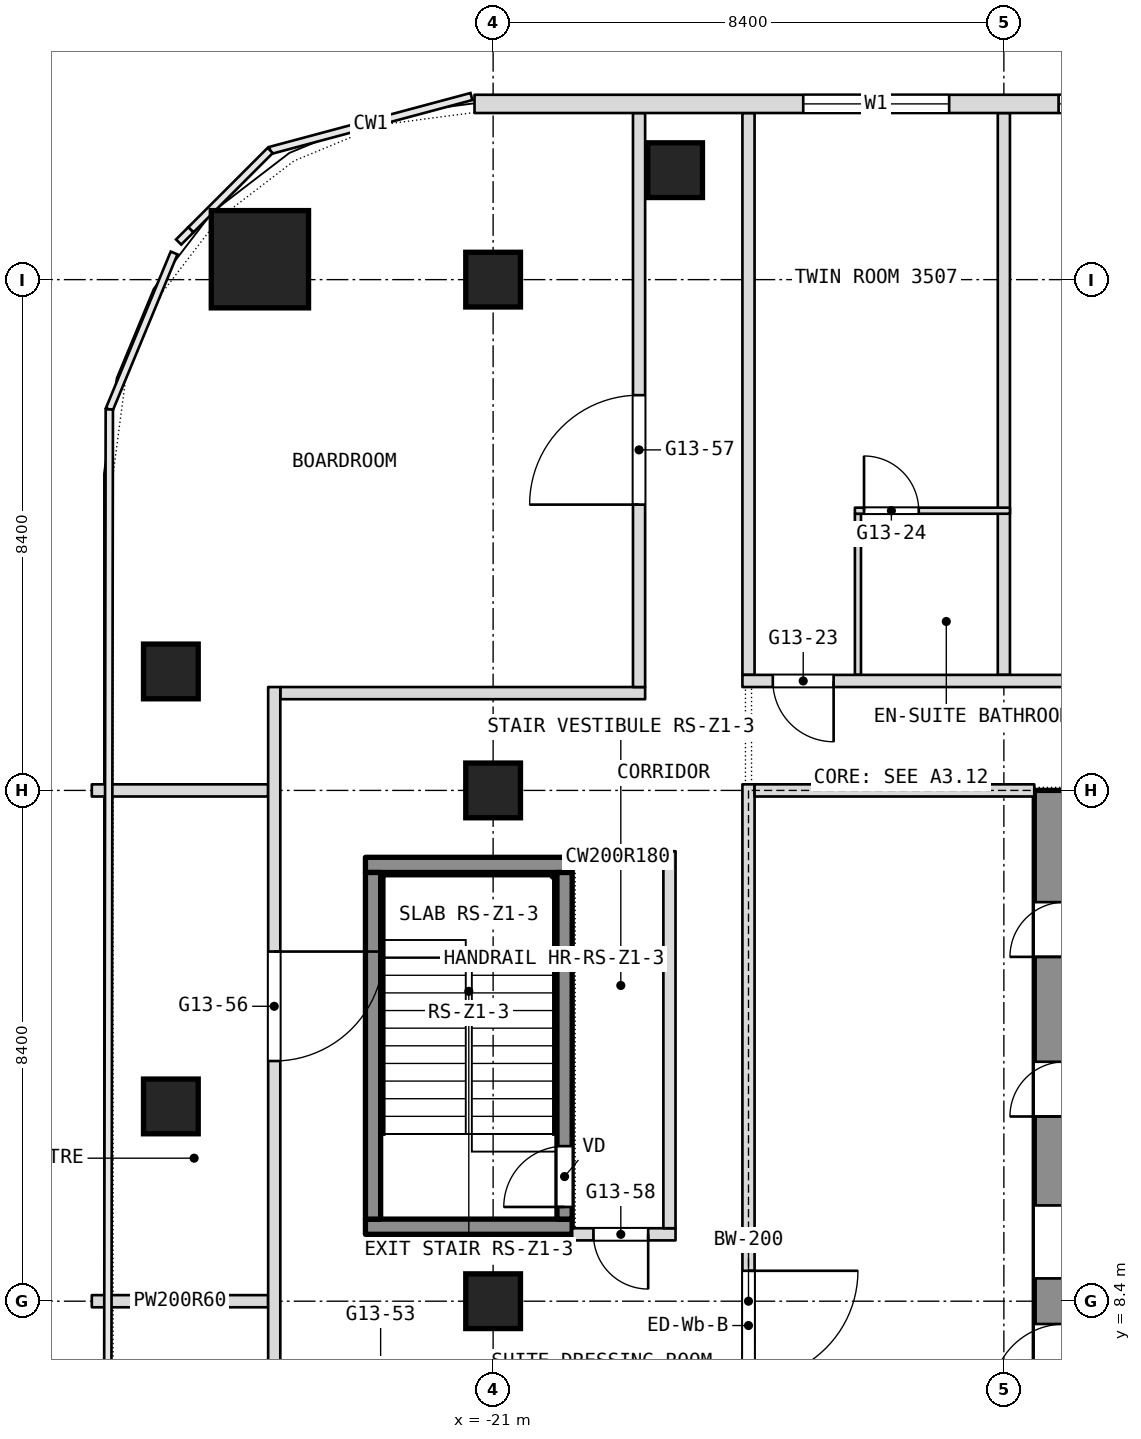
"""IFC4 building model, lengths in metres.
Left out: names, types, materials, properties, quantities, classifications, styles, units other than length and angle.
Written with IfcOpenShell. Run it as: python <this file> out.ifc"""

import sys

from ifc_helpers import new_model, si_unit, direction, frame, frame_2d, origin, origin_2d, place, context, subcontext, project, spatial, rectangle, extrude, element, fill, save


model = new_model("IFC4")
c1 = context("Model", 3, precision=1e-05, world=origin(), true_north=direction((0.0, 1.0)))
c2 = subcontext(c1, "Body", "Model", "MODEL_VIEW")
j1 = project(units=[si_unit("LENGTHUNIT", "METRE"), si_unit("PLANEANGLEUNIT", "RADIAN")], contexts=[c1])
p1 = place(None, origin())
s1 = spatial("IfcSite", under=j1, at=p1, CompositionType="ELEMENT")
p2 = place(p1, origin())
s2 = spatial("IfcBuilding", under=s1, at=p2, CompositionType="ELEMENT")
p3 = place(p2, frame((0.0, 0.0, 151.7)))
s3 = spatial("IfcBuildingStorey", under=s2, at=p3, CompositionType="ELEMENT", Elevation=151.7)
p4 = place(p3, frame((-11.6, 0.0, 0.0), z_axis=(0.0, 0.0, 1.0), x_axis=(0.0, 1.0, 0.0)))
e1 = element("IfcWall", 1, at=p4, inside=s3, PredefinedType="SHEAR", context=c2, shape_type="SweptSolid", body=[
    extrude(rectangle(XDim=16.8, YDim=1.0, at=frame_2d((8.4, 0.0))), origin(), (0.0, 0.0, 1.0), 3.6),
])
p5 = place(p4, frame((3.6, 0.0, 0.0)))
e2 = element("IfcOpeningElement", 2, at=p5, cuts=e1, PredefinedType="OPENING", context=c2, shape_type="SweptSolid", body=[
    extrude(rectangle(XDim=0.9, YDim=2.1, at=frame_2d((0.45, 1.05))), frame((0.0, 0.5, 0.0), z_axis=(0.0, -1.0, 0.0), x_axis=(1.0, 0.0, 0.0)), (0.0, 0.0, 1.0), 1.0),
])
p6 = place(p4, frame((6.825, 0.0, 0.0)))
e3 = element("IfcOpeningElement", 3, at=p6, cuts=e1, PredefinedType="OPENING", context=c2, shape_type="SweptSolid", body=[
    extrude(rectangle(XDim=1.2, YDim=2.1, at=frame_2d((0.6, 1.05))), frame((0.0, 0.5, 0.0), z_axis=(0.0, -1.0, 0.0), x_axis=(1.0, 0.0, 0.0)), (0.0, 0.0, 1.0), 1.0),
])
p7 = place(p4, frame((14.062, 0.0, 0.0)))
e4 = element("IfcOpeningElement", 4, at=p7, cuts=e1, PredefinedType="OPENING", context=c2, shape_type="SweptSolid", body=[
    extrude(rectangle(XDim=0.9, YDim=2.1, at=frame_2d((0.45, 1.05))), frame((0.0, 0.5, 0.0), z_axis=(0.0, -1.0, 0.0), x_axis=(1.0, 0.0, 0.0)), (0.0, 0.0, 1.0), 1.0),
])
p8 = place(p4, frame((11.438, 0.0, 0.0)))
e5 = element("IfcOpeningElement", 5, at=p8, cuts=e1, PredefinedType="OPENING", context=c2, shape_type="SweptSolid", body=[
    extrude(rectangle(XDim=0.9, YDim=2.1, at=frame_2d((0.45, 1.05))), frame((0.0, 0.5, 0.0), z_axis=(0.0, -1.0, 0.0), x_axis=(1.0, 0.0, 0.0)), (0.0, 0.0, 1.0), 1.0),
])
p9 = place(p4, frame((8.775, 0.0, 0.0)))
e6 = element("IfcOpeningElement", 6, at=p9, cuts=e1, PredefinedType="OPENING", context=c2, shape_type="SweptSolid", body=[
    extrude(rectangle(XDim=1.2, YDim=2.1, at=frame_2d((0.6, 1.05))), frame((0.0, 0.5, 0.0), z_axis=(0.0, -1.0, 0.0), x_axis=(1.0, 0.0, 0.0)), (0.0, 0.0, 1.0), 1.0),
])
p10 = place(p3, frame((-24.835, 25.535, 0.0), z_axis=(0.0, 0.0, 1.0), x_axis=(1.0, 0.0, 0.0)))
e7 = element("IfcColumn", 7, at=p10, inside=s3, PredefinedType="COLUMN", context=c2, shape_type="SweptSolid", body=[
    extrude(rectangle(XDim=1.6, YDim=1.6, at=origin_2d()), origin(), (0.0, 0.0, 1.0), 3.6),
])
for number, where, z_axis, x_axis in (
    (8, (-21.0, 8.4, 0.0), (0.0, 0.0, 1.0), (1.0, 0.0, 0.0)),
    (9, (-21.0, 16.8, 0.0), (0.0, 0.0, 1.0), (1.0, 0.0, 0.0)),
    (10, (-21.0, 25.2, 0.0), (0.0, 0.0, 1.0), (1.0, 0.0, 0.0)),
    (11, (-26.3, 11.603, 0.0), (0.0, 0.0, 1.0), (1.0, 0.0, 0.0)),
    (12, (-26.3, 18.756, 0.0), (0.0, 0.0, 1.0), (1.0, 0.0, 0.0)),
    (13, (-18.007, 27.0, 0.0), (0.0, 0.0, 1.0), (1.0, 0.0, 0.0)),
):
    element("IfcColumn", number, at=place(p3, frame(where, z_axis=z_axis, x_axis=x_axis)), inside=s3, PredefinedType="COLUMN", context=c2, shape_type="SweptSolid", body=[
        extrude(rectangle(XDim=0.9, YDim=0.9, at=origin_2d()), origin(), (0.0, 0.0, 1.0), 3.6),
    ])
p11 = place(p3, frame((-27.6, 8.4, 0.0), z_axis=(0.0, 0.0, 1.0), x_axis=(1.0, 0.0, 0.0)))
e14 = element("IfcWall", 14, at=p11, inside=s3, PredefinedType="PARTITIONING", context=c2, shape_type="SweptSolid", body=[
    extrude(rectangle(XDim=2.9, YDim=0.2, at=frame_2d((1.45, 0.0))), origin(), (0.0, 0.0, 1.0), 2.89),
])
p12 = place(p3, frame((-19.7, 9.5, 0.0), z_axis=(0.0, 0.0, 1.0), x_axis=(1.0, 0.0, 0.0)))
e15 = element("IfcWall", 15, at=p12, inside=s3, PredefinedType="PARTITIONING", context=c2, shape_type="SweptSolid", body=[
    extrude(rectangle(XDim=1.7, YDim=0.2, at=frame_2d((0.85, 0.0))), origin(), (0.0, 0.0, 1.0), 3.34),
])
p13 = place(p12, frame((0.35, 0.0, 0.0)))
e16 = element("IfcOpeningElement", 16, at=p13, cuts=e15, PredefinedType="OPENING", context=c2, shape_type="SweptSolid", body=[
    extrude(rectangle(XDim=0.9, YDim=2.1, at=frame_2d((0.45, 1.05))), frame((0.0, 0.1, 0.0), z_axis=(0.0, -1.0, 0.0), x_axis=(1.0, 0.0, 0.0)), (0.0, 0.0, 1.0), 0.2),
])
p14 = place(p3, frame((-12.6, 18.7, 0.0), z_axis=(0.0, 0.0, 1.0), x_axis=(0.0, 1.0, 0.0)))
e17 = element("IfcWall", 17, at=p14, inside=s3, PredefinedType="PARTITIONING", context=c2, shape_type="SweptSolid", body=[
    extrude(rectangle(XDim=9.24, YDim=0.2, at=frame_2d((4.62, 0.0))), origin(), (0.0, 0.0, 1.0), 3.34),
])
p15 = place(p3, frame((-15.0, 18.7, 0.0), z_axis=(0.0, 0.0, 1.0), x_axis=(0.0, 1.0, 0.0)))
e18 = element("IfcWall", 18, at=p15, inside=s3, PredefinedType="PARTITIONING", context=c2, shape_type="SweptSolid", body=[
    extrude(rectangle(XDim=2.65, YDim=0.1, at=frame_2d((1.325, 0.0))), origin(), (0.0, 0.0, 1.0), 3.34),
])
p16 = place(p3, frame((-19.7, 15.7, 0.0), z_axis=(0.0, 0.0, 1.0), x_axis=(1.0, 0.0, 0.0)))
e19 = element("IfcWall", 19, at=p16, inside=s3, PredefinedType="PARTITIONING", context=c2, shape_type="SweptSolid", body=[
    extrude(rectangle(XDim=1.5, YDim=0.2, at=frame_2d((0.75, 0.0))), origin(), (0.0, 0.0, 1.0), 3.34),
])
p17 = place(p3, frame((-16.8, 18.7, 0.0), z_axis=(0.0, 0.0, 1.0), x_axis=(0.0, 1.0, 0.0)))
e20 = element("IfcWall", 20, at=p17, inside=s3, PredefinedType="PARTITIONING", context=c2, shape_type="SweptSolid", body=[
    extrude(rectangle(XDim=9.24, YDim=0.2, at=frame_2d((4.62, 0.0))), origin(), (0.0, 0.0, 1.0), 3.34),
])
p18 = place(p3, frame((-27.6, 16.8, 0.0), z_axis=(0.0, 0.0, 1.0), x_axis=(1.0, 0.0, 0.0)))
e21 = element("IfcWall", 21, at=p18, inside=s3, PredefinedType="PARTITIONING", context=c2, shape_type="SweptSolid", body=[
    extrude(rectangle(XDim=2.9, YDim=0.2, at=frame_2d((1.45, 0.0))), origin(), (0.0, 0.0, 1.0), 2.89),
])
p19 = place(p3, frame((-18.1, 9.6, 0.0), z_axis=(0.0, 0.0, 1.0), x_axis=(0.0, 1.0, 0.0)))
e22 = element("IfcWall", 22, at=p19, inside=s3, PredefinedType="PARTITIONING", context=c2, shape_type="SweptSolid", body=[
    extrude(rectangle(XDim=6.2, YDim=0.2, at=frame_2d((3.1, 0.0))), origin(), (0.0, 0.0, 1.0), 3.34),
])
p20 = place(p3, frame((-24.5, 18.4, 0.0), z_axis=(0.0, 0.0, 1.0), x_axis=(1.0, 0.0, 0.0)))
e23 = element("IfcWall", 23, at=p20, inside=s3, PredefinedType="PARTITIONING", context=c2, shape_type="SweptSolid", body=[
    extrude(rectangle(XDim=6.0, YDim=0.2, at=frame_2d((3.0, 0.0))), origin(), (0.0, 0.0, 1.0), 3.34),
])
p21 = place(p3, frame((-18.6, 18.5, 0.0), z_axis=(0.0, 0.0, 1.0), x_axis=(0.0, 1.0, 0.0)))
e24 = element("IfcWall", 24, at=p21, inside=s3, PredefinedType="PARTITIONING", context=c2, shape_type="SweptSolid", body=[
    extrude(rectangle(XDim=9.44, YDim=0.2, at=frame_2d((4.72, 0.0))), origin(), (0.0, 0.0, 1.0), 3.34),
])
p22 = place(p21, frame((3.0, 0.0, 0.0)))
e25 = element("IfcOpeningElement", 25, at=p22, cuts=e24, PredefinedType="OPENING", context=c2, shape_type="SweptSolid", body=[
    extrude(rectangle(XDim=1.8, YDim=2.1, at=frame_2d((0.9, 1.05))), frame((0.0, 0.1, 0.0), z_axis=(0.0, -1.0, 0.0), x_axis=(1.0, 0.0, 0.0)), (0.0, 0.0, 1.0), 0.2),
])
p23 = place(p3, frame((-16.9, 18.6, 0.0), z_axis=(0.0, 0.0, 1.0), x_axis=(1.0, 0.0, 0.0)))
e26 = element("IfcWall", 26, at=p23, inside=s3, PredefinedType="PARTITIONING", context=c2, shape_type="SweptSolid", body=[
    extrude(rectangle(XDim=18.4, YDim=0.2, at=frame_2d((9.2, 0.0))), origin(), (0.0, 0.0, 1.0), 3.34),
])
p24 = place(p23, frame((0.5, 0.0, 0.0)))
e27 = element("IfcOpeningElement", 27, at=p24, cuts=e26, PredefinedType="OPENING", context=c2, shape_type="SweptSolid", body=[
    extrude(rectangle(XDim=1.0, YDim=2.1, at=frame_2d((0.5, 1.05))), frame((0.0, 0.1, 0.0), z_axis=(0.0, -1.0, 0.0), x_axis=(1.0, 0.0, 0.0)), (0.0, 0.0, 1.0), 0.2),
])
p25 = place(p23, frame((7.6, 0.0, 0.0)))
e28 = element("IfcOpeningElement", 28, at=p25, cuts=e26, PredefinedType="OPENING", context=c2, shape_type="SweptSolid", body=[
    extrude(rectangle(XDim=1.8, YDim=2.1, at=frame_2d((0.9, 1.05))), frame((0.0, 0.1, 0.0), z_axis=(0.0, -1.0, 0.0), x_axis=(1.0, 0.0, 0.0)), (0.0, 0.0, 1.0), 0.2),
])
p26 = place(p23, frame((15.0, 0.0, 0.0)))
e29 = element("IfcOpeningElement", 29, at=p26, cuts=e26, PredefinedType="OPENING", context=c2, shape_type="SweptSolid", body=[
    extrude(rectangle(XDim=1.0, YDim=2.1, at=frame_2d((0.5, 1.05))), frame((0.0, 0.1, 0.0), z_axis=(0.0, -1.0, 0.0), x_axis=(1.0, 0.0, 0.0)), (0.0, 0.0, 1.0), 0.2),
])
p27 = place(p3, frame((-15.05, 21.4, 0.0), z_axis=(0.0, 0.0, 1.0), x_axis=(1.0, 0.0, 0.0)))
e30 = element("IfcWall", 30, at=p27, inside=s3, PredefinedType="PARTITIONING", context=c2, shape_type="SweptSolid", body=[
    extrude(rectangle(XDim=2.55, YDim=0.1, at=frame_2d((1.275, 0.0))), origin(), (0.0, 0.0, 1.0), 3.34),
])
p28 = place(p27, frame((0.15, 0.0, 0.0)))
e31 = element("IfcOpeningElement", 31, at=p28, cuts=e30, PredefinedType="OPENING", context=c2, shape_type="SweptSolid", body=[
    extrude(rectangle(XDim=0.9, YDim=2.1, at=frame_2d((0.45, 1.05))), frame((0.0, 0.05, 0.0), z_axis=(0.0, -1.0, 0.0), x_axis=(1.0, 0.0, 0.0)), (0.0, 0.0, 1.0), 0.1),
])
p29 = place(p3, frame((-24.6, 6.9, 0.0), z_axis=(0.0, 0.0, 1.0), x_axis=(0.0, 1.0, 0.0)))
e32 = element("IfcWall", 32, at=p29, inside=s3, PredefinedType="PARTITIONING", context=c2, shape_type="SweptSolid", body=[
    extrude(rectangle(XDim=11.6, YDim=0.2, at=frame_2d((5.8, 0.0))), origin(), (0.0, 0.0, 1.0), 3.34),
])
p30 = place(p29, frame((5.45, 0.0, 0.0)))
e33 = element("IfcOpeningElement", 33, at=p30, cuts=e32, PredefinedType="OPENING", context=c2, shape_type="SweptSolid", body=[
    extrude(rectangle(XDim=1.8, YDim=2.1, at=frame_2d((0.9, 1.05))), frame((0.0, 0.1, 0.0), z_axis=(0.0, -1.0, 0.0), x_axis=(1.0, 0.0, 0.0)), (0.0, 0.0, 1.0), 0.2),
])
p31 = place(p3, frame((21.306, 28.09, 0.0), z_axis=(0.0, 0.0, 1.0), x_axis=(-1.0, 0.0, 0.0)))
e34 = element("IfcWall", 34, at=p31, inside=s3, PredefinedType="NOTDEFINED", context=c2, shape_type="SweptSolid", body=[
    extrude(rectangle(XDim=42.612, YDim=0.3, at=frame_2d((21.306, 0.0))), origin(), (0.0, 0.0, 1.0), 3.6),
])
p32 = place(p31, frame((5.406, 0.0, 0.9)))
e35 = element("IfcOpeningElement", 35, at=p32, cuts=e34, PredefinedType="OPENING", context=c2, shape_type="SweptSolid", body=[
    extrude(rectangle(XDim=2.4, YDim=2.1, at=frame_2d((1.2, 1.05))), frame((0.0, 0.15, 0.0), z_axis=(0.0, -1.0, 0.0), x_axis=(1.0, 0.0, 0.0)), (0.0, 0.0, 1.0), 0.3),
])
p33 = place(p31, frame((9.606, 0.0, 0.9)))
e36 = element("IfcOpeningElement", 36, at=p33, cuts=e34, PredefinedType="OPENING", context=c2, shape_type="SweptSolid", body=[
    extrude(rectangle(XDim=2.4, YDim=2.1, at=frame_2d((1.2, 1.05))), frame((0.0, 0.15, 0.0), z_axis=(0.0, -1.0, 0.0), x_axis=(1.0, 0.0, 0.0)), (0.0, 0.0, 1.0), 0.3),
])
p34 = place(p31, frame((13.806, 0.0, 0.9)))
e37 = element("IfcOpeningElement", 37, at=p34, cuts=e34, PredefinedType="OPENING", context=c2, shape_type="SweptSolid", body=[
    extrude(rectangle(XDim=2.4, YDim=2.1, at=frame_2d((1.2, 1.05))), frame((0.0, 0.15, 0.0), z_axis=(0.0, -1.0, 0.0), x_axis=(1.0, 0.0, 0.0)), (0.0, 0.0, 1.0), 0.3),
])
p35 = place(p31, frame((18.006, 0.0, 0.9)))
e38 = element("IfcOpeningElement", 38, at=p35, cuts=e34, PredefinedType="OPENING", context=c2, shape_type="SweptSolid", body=[
    extrude(rectangle(XDim=2.4, YDim=2.1, at=frame_2d((1.2, 1.05))), frame((0.0, 0.15, 0.0), z_axis=(0.0, -1.0, 0.0), x_axis=(1.0, 0.0, 0.0)), (0.0, 0.0, 1.0), 0.3),
])
p36 = place(p31, frame((22.206, 0.0, 0.9)))
e39 = element("IfcOpeningElement", 39, at=p36, cuts=e34, PredefinedType="OPENING", context=c2, shape_type="SweptSolid", body=[
    extrude(rectangle(XDim=2.4, YDim=2.1, at=frame_2d((1.2, 1.05))), frame((0.0, 0.15, 0.0), z_axis=(0.0, -1.0, 0.0), x_axis=(1.0, 0.0, 0.0)), (0.0, 0.0, 1.0), 0.3),
])
p37 = place(p31, frame((26.406, 0.0, 0.9)))
e40 = element("IfcOpeningElement", 40, at=p37, cuts=e34, PredefinedType="OPENING", context=c2, shape_type="SweptSolid", body=[
    extrude(rectangle(XDim=2.4, YDim=2.1, at=frame_2d((1.2, 1.05))), frame((0.0, 0.15, 0.0), z_axis=(0.0, -1.0, 0.0), x_axis=(1.0, 0.0, 0.0)), (0.0, 0.0, 1.0), 0.3),
])
p38 = place(p31, frame((30.606, 0.0, 0.9)))
e41 = element("IfcOpeningElement", 41, at=p38, cuts=e34, PredefinedType="OPENING", context=c2, shape_type="SweptSolid", body=[
    extrude(rectangle(XDim=2.4, YDim=2.1, at=frame_2d((1.2, 1.05))), frame((0.0, 0.15, 0.0), z_axis=(0.0, -1.0, 0.0), x_axis=(1.0, 0.0, 0.0)), (0.0, 0.0, 1.0), 0.3),
])
p39 = place(p31, frame((34.806, 0.0, 0.9)))
e42 = element("IfcOpeningElement", 42, at=p39, cuts=e34, PredefinedType="OPENING", context=c2, shape_type="SweptSolid", body=[
    extrude(rectangle(XDim=2.4, YDim=2.1, at=frame_2d((1.2, 1.05))), frame((0.0, 0.15, 0.0), z_axis=(0.0, -1.0, 0.0), x_axis=(1.0, 0.0, 0.0)), (0.0, 0.0, 1.0), 0.3),
])
p40 = place(p3, frame((-16.8, -0.1, 0.0), z_axis=(0.0, 0.0, 1.0), x_axis=(0.0, 1.0, 0.0)))
e43 = element("IfcWall", 43, at=p40, inside=s3, PredefinedType="PARTITIONING", context=c2, shape_type="SweptSolid", body=[
    extrude(rectangle(XDim=17.0, YDim=0.2, at=frame_2d((8.5, 0.0))), origin(), (0.0, 0.0, 1.0), 3.34),
])
p41 = place(p40, frame((2.2, 0.0, 0.0)))
e44 = element("IfcOpeningElement", 44, at=p41, cuts=e43, PredefinedType="OPENING", context=c2, shape_type="SweptSolid", body=[
    extrude(rectangle(XDim=1.8, YDim=2.1, at=frame_2d((0.9, 1.05))), frame((0.0, 0.1, 0.0), z_axis=(0.0, -1.0, 0.0), x_axis=(1.0, 0.0, 0.0)), (0.0, 0.0, 1.0), 0.2),
])
p42 = place(p40, frame((7.2, 0.0, 0.0)))
e45 = element("IfcOpeningElement", 45, at=p42, cuts=e43, PredefinedType="OPENING", context=c2, shape_type="SweptSolid", body=[
    extrude(rectangle(XDim=1.8, YDim=2.1, at=frame_2d((0.9, 1.05))), frame((0.0, 0.1, 0.0), z_axis=(0.0, -1.0, 0.0), x_axis=(1.0, 0.0, 0.0)), (0.0, 0.0, 1.0), 0.2),
])
p43 = place(p3, frame((-16.7, 16.8, 0.0), z_axis=(0.0, 0.0, 1.0), x_axis=(1.0, 0.0, 0.0)))
e46 = element("IfcWall", 46, at=p43, inside=s3, PredefinedType="PARTITIONING", context=c2, shape_type="SweptSolid", body=[
    extrude(rectangle(XDim=4.6, YDim=0.2, at=frame_2d((2.3, 0.0))), origin(), (0.0, 0.0, 1.0), 2.89),
])
for number, where, z_axis, x_axis in (
    (47, (-23.1, 9.625, 0.1), (0.0, 0.0, 1.0), (1.0, 0.0, 0.0)),
    (48, (-23.1, 15.575, 0.1), (0.0, 0.0, 1.0), (1.0, 0.0, 0.0)),
):
    element("IfcWall", number, at=place(p3, frame(where, z_axis=z_axis, x_axis=x_axis)), inside=s3, PredefinedType="SHEAR", context=c2, shape_type="SweptSolid", body=[
        extrude(rectangle(XDim=3.4, YDim=0.25, at=frame_2d((1.7, 0.0))), origin(), (0.0, 0.0, 1.0), 3.6),
    ])
p44 = place(p3, frame((-22.975, 9.75, 0.1), z_axis=(0.0, 0.0, 1.0), x_axis=(0.0, 1.0, 0.0)))
e49 = element("IfcWall", 49, at=p44, inside=s3, PredefinedType="SHEAR", context=c2, shape_type="SweptSolid", body=[
    extrude(rectangle(XDim=5.7, YDim=0.25, at=frame_2d((2.85, 0.0))), origin(), (0.0, 0.0, 1.0), 3.6),
])
p45 = place(p3, frame((-19.825, 9.75, 0.1), z_axis=(0.0, 0.0, 1.0), x_axis=(0.0, 1.0, 0.0)))
e50 = element("IfcWall", 50, at=p45, inside=s3, PredefinedType="SHEAR", context=c2, shape_type="SweptSolid", body=[
    extrude(rectangle(XDim=5.7, YDim=0.25, at=frame_2d((2.85, 0.0))), origin(), (0.0, 0.0, 1.0), 3.6),
])
p46 = place(p45, frame((0.2, 0.0, 0.0)))
e51 = element("IfcOpeningElement", 51, at=p46, cuts=e50, PredefinedType="OPENING", context=c2, shape_type="SweptSolid", body=[
    extrude(rectangle(XDim=1.0, YDim=2.1, at=frame_2d((0.5, 1.05))), frame((0.0, 0.125, 0.0), z_axis=(0.0, -1.0, 0.0), x_axis=(1.0, 0.0, 0.0)), (0.0, 0.0, 1.0), 0.25),
])
p47 = place(p13, origin())
e52 = element("IfcDoor", 52, at=p47, inside=s3, OperationType="SINGLE_SWING_RIGHT", PredefinedType="DOOR", context=c2, shape_type="SweptSolid", body=[
    extrude(rectangle(XDim=0.9, YDim=2.1, at=frame_2d((0.45, 1.05))), frame((0.0, 0.025, 0.0), z_axis=(0.0, -1.0, 0.0), x_axis=(1.0, 0.0, 0.0)), (0.0, 0.0, 1.0), 0.05),
])
fill(e16, e52)
p48 = place(p22, origin())
e53 = element("IfcDoor", 53, at=p48, inside=s3, OperationType="DOUBLE_DOOR_SINGLE_SWING", PredefinedType="DOOR", context=c2, shape_type="SweptSolid", body=[
    extrude(rectangle(XDim=1.8, YDim=2.1, at=frame_2d((0.9, 1.05))), frame((0.0, 0.025, 0.0), z_axis=(0.0, -1.0, 0.0), x_axis=(1.0, 0.0, 0.0)), (0.0, 0.0, 1.0), 0.05),
])
fill(e25, e53)
p49 = place(p24, origin())
e54 = element("IfcDoor", 54, at=p49, inside=s3, OperationType="SINGLE_SWING_RIGHT", PredefinedType="DOOR", context=c2, shape_type="SweptSolid", body=[
    extrude(rectangle(XDim=1.0, YDim=2.1, at=frame_2d((0.5, 1.05))), frame((0.0, 0.025, 0.0), z_axis=(0.0, -1.0, 0.0), x_axis=(1.0, 0.0, 0.0)), (0.0, 0.0, 1.0), 0.05),
])
fill(e27, e54)
p50 = place(p28, origin())
e55 = element("IfcDoor", 55, at=p50, inside=s3, OperationType="SINGLE_SWING_RIGHT", PredefinedType="DOOR", context=c2, shape_type="SweptSolid", body=[
    extrude(rectangle(XDim=0.9, YDim=2.1, at=frame_2d((0.45, 1.05))), frame((0.0, 0.025, 0.0), z_axis=(0.0, -1.0, 0.0), x_axis=(1.0, 0.0, 0.0)), (0.0, 0.0, 1.0), 0.05),
])
fill(e31, e55)
p51 = place(p30, origin())
e56 = element("IfcDoor", 56, at=p51, inside=s3, OperationType="DOUBLE_DOOR_SINGLE_SWING", PredefinedType="DOOR", context=c2, shape_type="SweptSolid", body=[
    extrude(rectangle(XDim=1.8, YDim=2.1, at=frame_2d((0.9, 1.05))), frame((0.0, 0.025, 0.0), z_axis=(0.0, -1.0, 0.0), x_axis=(1.0, 0.0, 0.0)), (0.0, 0.0, 1.0), 0.05),
])
fill(e33, e56)
p52 = place(p38, origin())
e57 = element("IfcWindow", 57, at=p52, inside=s3, PartitioningType="SINGLE_PANEL", PredefinedType="WINDOW", context=c2, shape_type="SweptSolid", body=[
    extrude(rectangle(XDim=2.4, YDim=2.1, at=frame_2d((1.2, 1.05))), frame((0.0, 0.03, 0.0), z_axis=(0.0, -1.0, 0.0), x_axis=(1.0, 0.0, 0.0)), (0.0, 0.0, 1.0), 0.06),
])
fill(e41, e57)
p53 = place(p39, origin())
e58 = element("IfcWindow", 58, at=p53, inside=s3, PartitioningType="SINGLE_PANEL", PredefinedType="WINDOW", context=c2, shape_type="SweptSolid", body=[
    extrude(rectangle(XDim=2.4, YDim=2.1, at=frame_2d((1.2, 1.05))), frame((0.0, 0.03, 0.0), z_axis=(0.0, -1.0, 0.0), x_axis=(1.0, 0.0, 0.0)), (0.0, 0.0, 1.0), 0.06),
])
fill(e42, e58)
p54 = place(p46, origin())
e59 = element("IfcDoor", 59, at=p54, inside=s3, OperationType="SINGLE_SWING_LEFT", PredefinedType="DOOR", context=c2, shape_type="SweptSolid", body=[
    extrude(rectangle(XDim=1.0, YDim=2.1, at=frame_2d((0.5, 1.05))), frame((0.0, 0.025, 0.0), z_axis=(0.0, -1.0, 0.0), x_axis=(1.0, 0.0, 0.0)), (0.0, 0.0, 1.0), 0.05),
])
fill(e51, e59)
p55 = place(p42, origin())
e60 = element("IfcDoor", 60, at=p55, inside=s3, OperationType="DOUBLE_DOOR_SINGLE_SWING", PredefinedType="DOOR", context=c2, shape_type="SweptSolid", body=[
    extrude(rectangle(XDim=1.8, YDim=2.1, at=frame_2d((0.9, 1.05))), frame((0.0, 0.025, 0.0), z_axis=(0.0, -1.0, 0.0), x_axis=(1.0, 0.0, 0.0)), (0.0, 0.0, 1.0), 0.05),
])
fill(e45, e60)
save(model, sys.argv[1])
